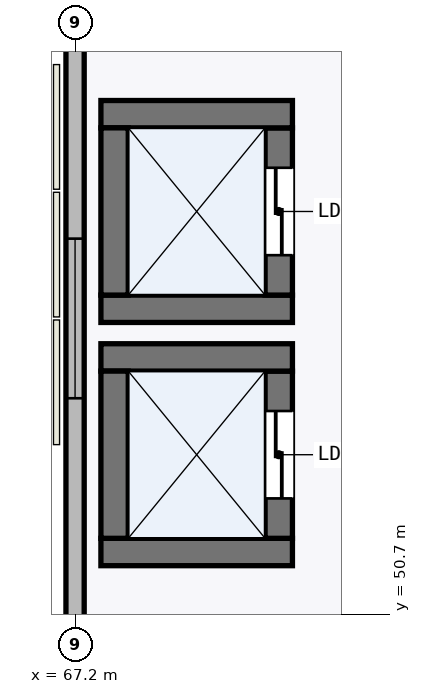
"""IFC4 building model, lengths in metres.
Left out: names, types, materials, properties, quantities, classifications, styles, units other than length and angle.
Written with IfcOpenShell. Run it as: python <this file> out.ifc"""

import sys

from ifc_helpers import new_model, si_unit, direction, frame, frame_2d, origin, place, context, subcontext, project, spatial, rectangle, extrude, element, fill, save


model = new_model("IFC4")
c1 = context("Model", 3, precision=1e-05, world=origin(), true_north=direction((0.0, 1.0)))
c2 = subcontext(c1, "Body", "Model", "MODEL_VIEW")
j1 = project(units=[si_unit("LENGTHUNIT", "METRE"), si_unit("PLANEANGLEUNIT", "RADIAN")], contexts=[c1])
p1 = place(None, origin())
s1 = spatial("IfcSite", under=j1, at=p1, CompositionType="ELEMENT")
p2 = place(p1, origin())
s2 = spatial("IfcBuilding", under=s1, at=p2, CompositionType="ELEMENT")
p3 = place(p2, frame((0.0, 0.0, 11.4)))
s3 = spatial("IfcBuildingStorey", under=s2, at=p3, CompositionType="ELEMENT", Elevation=11.4)
p4 = place(p3, frame((67.2, 58.602, 0.0), z_axis=(0.0, 0.0, 1.0), x_axis=(0.0, -1.0, 0.0)))
e1 = element("IfcWall", 1, at=p4, inside=s3, PredefinedType="STANDARD", context=c2, shape_type="SweptSolid", body=[
    extrude(rectangle(XDim=8.019, YDim=0.24, at=frame_2d((4.009, 0.0))), origin(), (0.0, 0.0, 1.0), 4.397),
])
p5 = place(p4, frame((2.959, 0.0, 0.95)))
e2 = element("IfcOpeningElement", 2, at=p5, cuts=e1, PredefinedType="OPENING", context=c2, shape_type="SweptSolid", body=[
    extrude(rectangle(XDim=2.1, YDim=2.4, at=frame_2d((1.05, 1.2))), frame((0.0, 0.13, 0.0), z_axis=(0.0, -1.0, 0.0), x_axis=(1.0, 0.0, 0.0)), (0.0, 0.0, 1.0), 0.26),
])
p6 = place(p3, frame((67.54, 51.52, 0.0), z_axis=(0.0, 0.0, 1.0), x_axis=(1.0, 0.0, 0.0)))
e3 = element("IfcWall", 3, at=p6, inside=s3, PredefinedType="SHEAR", context=c2, shape_type="SweptSolid", body=[
    extrude(rectangle(XDim=2.52, YDim=0.36, at=frame_2d((1.26, 0.0))), origin(), (0.0, 0.0, 1.0), 4.845),
])
p7 = place(p3, frame((69.88, 51.7, 0.0), z_axis=(0.0, 0.0, 1.0), x_axis=(0.0, 1.0, 0.0)))
e4 = element("IfcWall", 4, at=p7, inside=s3, PredefinedType="SHEAR", context=c2, shape_type="SweptSolid", body=[
    extrude(rectangle(XDim=2.2, YDim=0.36, at=frame_2d((1.1, 0.0))), origin(), (0.0, 0.0, 1.0), 4.845),
])
p8 = place(p7, frame((0.525, 0.0, 0.0)))
e5 = element("IfcOpeningElement", 5, at=p8, cuts=e4, PredefinedType="OPENING", context=c2, shape_type="SweptSolid", body=[
    extrude(rectangle(XDim=1.15, YDim=2.2, at=frame_2d((0.575, 1.1))), frame((0.0, 0.19, 0.0), z_axis=(0.0, -1.0, 0.0), x_axis=(1.0, 0.0, 0.0)), (0.0, 0.0, 1.0), 0.38),
])
p9 = place(p3, frame((70.06, 54.08, 0.0), z_axis=(0.0, 0.0, 1.0), x_axis=(-1.0, 0.0, 0.0)))
e6 = element("IfcWall", 6, at=p9, inside=s3, PredefinedType="SHEAR", context=c2, shape_type="SweptSolid", body=[
    extrude(rectangle(XDim=2.52, YDim=0.36, at=frame_2d((1.26, 0.0))), origin(), (0.0, 0.0, 1.0), 4.845),
])
p10 = place(p3, frame((67.72, 53.9, 0.0), z_axis=(0.0, 0.0, 1.0), x_axis=(0.0, -1.0, 0.0)))
e7 = element("IfcWall", 7, at=p10, inside=s3, PredefinedType="SHEAR", context=c2, shape_type="SweptSolid", body=[
    extrude(rectangle(XDim=2.2, YDim=0.36, at=frame_2d((1.1, 0.0))), origin(), (0.0, 0.0, 1.0), 4.845),
])
p11 = place(p3, frame((67.54, 54.72, 0.0), z_axis=(0.0, 0.0, 1.0), x_axis=(1.0, 0.0, 0.0)))
e8 = element("IfcWall", 8, at=p11, inside=s3, PredefinedType="SHEAR", context=c2, shape_type="SweptSolid", body=[
    extrude(rectangle(XDim=2.52, YDim=0.36, at=frame_2d((1.26, 0.0))), origin(), (0.0, 0.0, 1.0), 4.845),
])
p12 = place(p3, frame((69.88, 54.9, 0.0), z_axis=(0.0, 0.0, 1.0), x_axis=(0.0, 1.0, 0.0)))
e9 = element("IfcWall", 9, at=p12, inside=s3, PredefinedType="SHEAR", context=c2, shape_type="SweptSolid", body=[
    extrude(rectangle(XDim=2.2, YDim=0.36, at=frame_2d((1.1, 0.0))), origin(), (0.0, 0.0, 1.0), 4.845),
])
p13 = place(p12, frame((0.525, 0.0, 0.0)))
e10 = element("IfcOpeningElement", 10, at=p13, cuts=e9, PredefinedType="OPENING", context=c2, shape_type="SweptSolid", body=[
    extrude(rectangle(XDim=1.15, YDim=2.2, at=frame_2d((0.575, 1.1))), frame((0.0, 0.19, 0.0), z_axis=(0.0, -1.0, 0.0), x_axis=(1.0, 0.0, 0.0)), (0.0, 0.0, 1.0), 0.38),
])
p14 = place(p3, frame((70.06, 57.28, 0.0), z_axis=(0.0, 0.0, 1.0), x_axis=(-1.0, 0.0, 0.0)))
e11 = element("IfcWall", 11, at=p14, inside=s3, PredefinedType="SHEAR", context=c2, shape_type="SweptSolid", body=[
    extrude(rectangle(XDim=2.52, YDim=0.36, at=frame_2d((1.26, 0.0))), origin(), (0.0, 0.0, 1.0), 4.845),
])
p15 = place(p3, frame((67.72, 57.1, 0.0), z_axis=(0.0, 0.0, 1.0), x_axis=(0.0, -1.0, 0.0)))
e12 = element("IfcWall", 12, at=p15, inside=s3, PredefinedType="SHEAR", context=c2, shape_type="SweptSolid", body=[
    extrude(rectangle(XDim=2.2, YDim=0.36, at=frame_2d((1.1, 0.0))), origin(), (0.0, 0.0, 1.0), 4.845),
])
p16 = place(p5, origin())
e13 = element("IfcWindow", 13, at=p16, inside=s3, PartitioningType="SINGLE_PANEL", PredefinedType="WINDOW", context=c2, shape_type="SweptSolid", body=[
    extrude(rectangle(XDim=2.1, YDim=2.4, at=frame_2d((1.05, 1.2))), frame((0.0, 0.03, 0.0), z_axis=(0.0, -1.0, 0.0), x_axis=(1.0, 0.0, 0.0)), (0.0, 0.0, 1.0), 0.06),
])
fill(e2, e13)
p17 = place(p8, frame((1.15, 0.0, 0.0), z_axis=(0.0, 0.0, 1.0), x_axis=(-1.0, 0.0, 0.0)))
e14 = element("IfcDoor", 14, at=p17, inside=s3, OperationType="DOUBLE_DOOR_SLIDING", PredefinedType="DOOR", context=c2, shape_type="SweptSolid", body=[
    extrude(rectangle(XDim=1.15, YDim=2.2, at=frame_2d((0.575, 1.1))), frame((0.0, 0.025, 0.0), z_axis=(0.0, -1.0, 0.0), x_axis=(1.0, 0.0, 0.0)), (0.0, 0.0, 1.0), 0.05),
])
fill(e5, e14)
p18 = place(p13, frame((1.15, 0.0, 0.0), z_axis=(0.0, 0.0, 1.0), x_axis=(-1.0, 0.0, 0.0)))
e15 = element("IfcDoor", 15, at=p18, inside=s3, OperationType="DOUBLE_DOOR_SLIDING", PredefinedType="DOOR", context=c2, shape_type="SweptSolid", body=[
    extrude(rectangle(XDim=1.15, YDim=2.2, at=frame_2d((0.575, 1.1))), frame((0.0, 0.025, 0.0), z_axis=(0.0, -1.0, 0.0), x_axis=(1.0, 0.0, 0.0)), (0.0, 0.0, 1.0), 0.05),
])
fill(e10, e15)
save(model, sys.argv[1])
